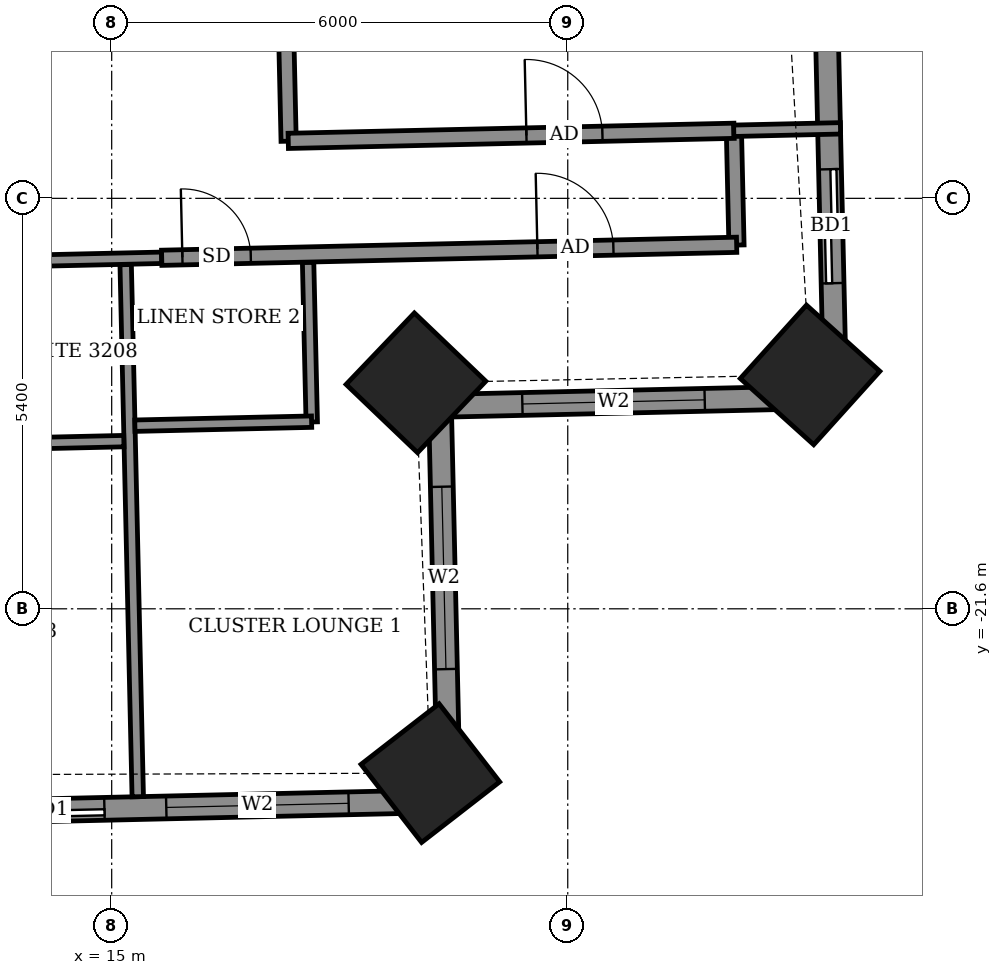
"""IFC4 building model, lengths in metres.
Left out: names, types, materials, properties, quantities, classifications, styles, units other than length and angle.
Written with IfcOpenShell. Run it as: python <this file> out.ifc"""

import sys

from ifc_helpers import new_model, si_unit, direction, frame, frame_2d, origin, origin_2d, place, context, subcontext, project, spatial, rectangle, extrude, element, fill, save


model = new_model("IFC4")
c1 = context("Model", 3, precision=1e-05, world=origin(), true_north=direction((0.0, 1.0)))
c2 = subcontext(c1, "Body", "Model", "MODEL_VIEW")
j1 = project(units=[si_unit("LENGTHUNIT", "METRE"), si_unit("PLANEANGLEUNIT", "RADIAN")], contexts=[c1])
p1 = place(None, origin())
s1 = spatial("IfcSite", under=j1, at=p1, CompositionType="ELEMENT")
p2 = place(p1, origin())
s2 = spatial("IfcBuilding", under=s1, at=p2, CompositionType="ELEMENT")
p3 = place(p2, frame((0.0, 0.0, 130.1)))
s3 = spatial("IfcBuildingStorey", under=s2, at=p3, CompositionType="ELEMENT", Elevation=130.1)
for number, where, z_axis, x_axis in (
    (1, (19.192, -23.761, -0.55), (0.0, 0.0, 1.0), (0.79, 0.613, 0.0)),
    (2, (19.003, -18.627, -0.55), (0.0, 0.0, 1.0), (0.691, 0.723, 0.0)),
    (3, (24.188, -18.523, -0.55), (0.0, 0.0, 1.0), (0.67, 0.743, 0.0)),
):
    element("IfcColumn", number, at=place(p3, frame(where, z_axis=z_axis, x_axis=x_axis)), inside=s3, PredefinedType="COLUMN", context=c2, shape_type="SweptSolid", body=[
        extrude(rectangle(XDim=1.3, YDim=1.3, at=origin_2d()), origin(), (0.0, 0.0, 1.0), 3.6),
    ])
p4 = place(p3, frame((24.518, -18.812, 0.0), z_axis=(0.0, 0.0, 1.0), x_axis=(-0.02269451316, 0.999742446369, 0.0)))
e4 = element("IfcWall", 4, at=p4, inside=s3, PredefinedType="SOLIDWALL", context=c2, shape_type="SweptSolid", body=[
    extrude(rectangle(XDim=10.93, YDim=0.3, at=frame_2d((5.465, 0.0))), origin(), (0.0, 0.0, 1.0), 3.05),
])
p5 = place(p4, frame((1.496, 0.0, 0.0)))
e5 = element("IfcOpeningElement", 5, at=p5, cuts=e4, PredefinedType="OPENING", context=c2, shape_type="SweptSolid", body=[
    extrude(rectangle(XDim=1.5, YDim=2.4, at=frame_2d((0.75, 1.2))), frame((0.0, 0.16, 0.0), z_axis=(0.0, -1.0, 0.0), x_axis=(1.0, 0.0, 0.0)), (0.0, 0.0, 1.0), 0.32),
])
p6 = place(p4, frame((6.244, 0.0, 0.9)))
e6 = element("IfcOpeningElement", 6, at=p6, cuts=e4, PredefinedType="OPENING", context=c2, shape_type="SweptSolid", body=[
    extrude(rectangle(XDim=0.9, YDim=1.5, at=frame_2d((0.45, 0.75))), frame((0.0, 0.16, 0.0), z_axis=(0.0, -1.0, 0.0), x_axis=(1.0, 0.0, 0.0)), (0.0, 0.0, 1.0), 0.32),
])
p7 = place(p4, frame((8.4, 0.0, 0.9)))
e7 = element("IfcOpeningElement", 7, at=p7, cuts=e4, PredefinedType="OPENING", context=c2, shape_type="SweptSolid", body=[
    extrude(rectangle(XDim=1.2, YDim=1.5, at=frame_2d((0.6, 0.75))), frame((0.0, 0.16, 0.0), z_axis=(0.0, -1.0, 0.0), x_axis=(1.0, 0.0, 0.0)), (0.0, 0.0, 1.0), 0.32),
])
p8 = place(p3, frame((-22.396, -25.078, 0.0), z_axis=(0.0, 0.0, 1.0), x_axis=(0.99974279854, 0.022678993965, 0.0)))
e8 = element("IfcWall", 8, at=p8, inside=s3, PredefinedType="SOLIDWALL", context=c2, shape_type="SweptSolid", body=[
    extrude(rectangle(XDim=41.844, YDim=0.3, at=frame_2d((20.922, 0.0))), origin(), (0.0, 0.0, 1.0), 3.05),
])
p9 = place(p8, frame((1.696, 0.0, 0.0)))
e9 = element("IfcOpeningElement", 9, at=p9, cuts=e8, PredefinedType="OPENING", context=c2, shape_type="SweptSolid", body=[
    extrude(rectangle(XDim=1.5, YDim=2.4, at=frame_2d((0.75, 1.2))), frame((0.0, 0.16, 0.0), z_axis=(0.0, -1.0, 0.0), x_axis=(1.0, 0.0, 0.0)), (0.0, 0.0, 1.0), 0.32),
])
p10 = place(p8, frame((4.512, 0.0, 0.0)))
e10 = element("IfcOpeningElement", 10, at=p10, cuts=e8, PredefinedType="OPENING", context=c2, shape_type="SweptSolid", body=[
    extrude(rectangle(XDim=1.5, YDim=2.4, at=frame_2d((0.75, 1.2))), frame((0.0, 0.16, 0.0), z_axis=(0.0, -1.0, 0.0), x_axis=(1.0, 0.0, 0.0)), (0.0, 0.0, 1.0), 0.32),
])
p11 = place(p8, frame((9.625, 0.0, 0.0)))
e11 = element("IfcOpeningElement", 11, at=p11, cuts=e8, PredefinedType="OPENING", context=c2, shape_type="SweptSolid", body=[
    extrude(rectangle(XDim=1.5, YDim=2.4, at=frame_2d((0.75, 1.2))), frame((0.0, 0.16, 0.0), z_axis=(0.0, -1.0, 0.0), x_axis=(1.0, 0.0, 0.0)), (0.0, 0.0, 1.0), 0.32),
])
p12 = place(p8, frame((14.749, 0.0, 0.0)))
e12 = element("IfcOpeningElement", 12, at=p12, cuts=e8, PredefinedType="OPENING", context=c2, shape_type="SweptSolid", body=[
    extrude(rectangle(XDim=1.5, YDim=2.4, at=frame_2d((0.75, 1.2))), frame((0.0, 0.16, 0.0), z_axis=(0.0, -1.0, 0.0), x_axis=(1.0, 0.0, 0.0)), (0.0, 0.0, 1.0), 0.32),
])
p13 = place(p8, frame((17.861, 0.0, 0.0)))
e13 = element("IfcOpeningElement", 13, at=p13, cuts=e8, PredefinedType="OPENING", context=c2, shape_type="SweptSolid", body=[
    extrude(rectangle(XDim=1.5, YDim=2.4, at=frame_2d((0.75, 1.2))), frame((0.0, 0.16, 0.0), z_axis=(0.0, -1.0, 0.0), x_axis=(1.0, 0.0, 0.0)), (0.0, 0.0, 1.0), 0.32),
])
p14 = place(p8, frame((22.486, 0.0, 0.0)))
e14 = element("IfcOpeningElement", 14, at=p14, cuts=e8, PredefinedType="OPENING", context=c2, shape_type="SweptSolid", body=[
    extrude(rectangle(XDim=1.5, YDim=2.4, at=frame_2d((0.75, 1.2))), frame((0.0, 0.16, 0.0), z_axis=(0.0, -1.0, 0.0), x_axis=(1.0, 0.0, 0.0)), (0.0, 0.0, 1.0), 0.32),
])
p15 = place(p8, frame((25.598, 0.0, 0.0)))
e15 = element("IfcOpeningElement", 15, at=p15, cuts=e8, PredefinedType="OPENING", context=c2, shape_type="SweptSolid", body=[
    extrude(rectangle(XDim=1.5, YDim=2.4, at=frame_2d((0.75, 1.2))), frame((0.0, 0.16, 0.0), z_axis=(0.0, -1.0, 0.0), x_axis=(1.0, 0.0, 0.0)), (0.0, 0.0, 1.0), 0.32),
])
p16 = place(p8, frame((30.7, 0.0, 0.0)))
e16 = element("IfcOpeningElement", 16, at=p16, cuts=e8, PredefinedType="OPENING", context=c2, shape_type="SweptSolid", body=[
    extrude(rectangle(XDim=1.5, YDim=2.4, at=frame_2d((0.75, 1.2))), frame((0.0, 0.16, 0.0), z_axis=(0.0, -1.0, 0.0), x_axis=(1.0, 0.0, 0.0)), (0.0, 0.0, 1.0), 0.32),
])
p17 = place(p8, frame((35.81, 0.0, 0.0)))
e17 = element("IfcOpeningElement", 17, at=p17, cuts=e8, PredefinedType="OPENING", context=c2, shape_type="SweptSolid", body=[
    extrude(rectangle(XDim=1.5, YDim=2.4, at=frame_2d((0.75, 1.2))), frame((0.0, 0.16, 0.0), z_axis=(0.0, -1.0, 0.0), x_axis=(1.0, 0.0, 0.0)), (0.0, 0.0, 1.0), 0.32),
])
p18 = place(p8, frame((38.124, 0.0, 0.9)))
e18 = element("IfcOpeningElement", 18, at=p18, cuts=e8, PredefinedType="OPENING", context=c2, shape_type="SweptSolid", body=[
    extrude(rectangle(XDim=2.4, YDim=1.5, at=frame_2d((1.2, 0.75))), frame((0.0, 0.16, 0.0), z_axis=(0.0, -1.0, 0.0), x_axis=(1.0, 0.0, 0.0)), (0.0, 0.0, 1.0), 0.32),
])
p19 = place(p3, frame((19.437, -24.129, 0.0), z_axis=(0.0, 0.0, 1.0), x_axis=(-0.022675548694, 0.99974287669, 0.0)))
e19 = element("IfcWall", 19, at=p19, inside=s3, PredefinedType="SOLIDWALL", context=c2, shape_type="SweptSolid", body=[
    extrude(rectangle(XDim=5.2, YDim=0.3, at=frame_2d((2.6, 0.0))), origin(), (0.0, 0.0, 1.0), 2.55),
])
p20 = place(p19, frame((1.736, 0.0, 0.9)))
e20 = element("IfcOpeningElement", 20, at=p20, cuts=e19, PredefinedType="OPENING", context=c2, shape_type="SweptSolid", body=[
    extrude(rectangle(XDim=2.4, YDim=1.5, at=frame_2d((1.2, 0.75))), frame((0.0, 0.16, 0.0), z_axis=(0.0, -1.0, 0.0), x_axis=(1.0, 0.0, 0.0)), (0.0, 0.0, 1.0), 0.32),
])
p21 = place(p3, frame((19.319, -18.93, 0.0), z_axis=(0.0, 0.0, 1.0), x_axis=(0.99974287669, 0.022675548694, 0.0)))
e21 = element("IfcWall", 21, at=p21, inside=s3, PredefinedType="SOLIDWALL", context=c2, shape_type="SweptSolid", body=[
    extrude(rectangle(XDim=5.2, YDim=0.3, at=frame_2d((2.6, 0.0))), origin(), (0.0, 0.0, 1.0), 2.55),
])
p22 = place(p21, frame((1.084, 0.0, 0.9)))
e22 = element("IfcOpeningElement", 22, at=p22, cuts=e21, PredefinedType="OPENING", context=c2, shape_type="SweptSolid", body=[
    extrude(rectangle(XDim=2.4, YDim=1.5, at=frame_2d((1.2, 0.75))), frame((0.0, 0.16, 0.0), z_axis=(0.0, -1.0, 0.0), x_axis=(1.0, 0.0, 0.0)), (0.0, 0.0, 1.0), 0.32),
])
p23 = place(p3, frame((15.343, -24.072, 0.0), z_axis=(0.0, 0.0, 1.0), x_axis=(-0.022699227919, 0.999742339331, 0.0)))
e23 = element("IfcWall", 23, at=p23, inside=s3, PredefinedType="PARTITIONING", context=c2, shape_type="SweptSolid", body=[
    extrude(rectangle(XDim=7.002, YDim=0.15, at=frame_2d((3.501, 0.0))), origin(), (0.0, 0.0, 1.0), 2.55),
])
p24 = place(p3, frame((12.835, -19.447, 0.0), z_axis=(0.0, 0.0, 1.0), x_axis=(0.999740478815, 0.022781023197, 0.0)))
e24 = element("IfcWall", 24, at=p24, inside=s3, PredefinedType="PARTITIONING", context=c2, shape_type="SweptSolid", body=[
    extrude(rectangle(XDim=2.325, YDim=0.15, at=frame_2d((1.163, 0.0))), origin(), (0.0, 0.0, 1.0), 3.05),
])
p25 = place(p3, frame((17.632, -19.142, 0.0), z_axis=(0.0, 0.0, 1.0), x_axis=(-0.022906293375, 0.999737616439, 0.0)))
e25 = element("IfcWall", 25, at=p25, inside=s3, PredefinedType="PARTITIONING", context=c2, shape_type="SweptSolid", body=[
    extrude(rectangle(XDim=2.1, YDim=0.15, at=frame_2d((1.05, 0.0))), origin(), (0.0, 0.0, 1.0), 3.05),
])
p26 = place(p3, frame((15.305, -19.191, 0.0), z_axis=(0.0, 0.0, 1.0), x_axis=(0.999740478815, 0.022781023197, 0.0)))
e26 = element("IfcWall", 26, at=p26, inside=s3, PredefinedType="PARTITIONING", context=c2, shape_type="SweptSolid", body=[
    extrude(rectangle(XDim=2.325, YDim=0.15, at=frame_2d((1.163, 0.0))), origin(), (0.0, 0.0, 1.0), 3.05),
])
p27 = place(p3, frame((23.22, -16.815, 0.0), z_axis=(0.0, 0.0, 1.0), x_axis=(-0.022617910375, 0.999744182344, 0.0)))
e27 = element("IfcWall", 27, at=p27, inside=s3, PredefinedType="PARTITIONING", context=c2, shape_type="SweptSolid", body=[
    extrude(rectangle(XDim=1.5, YDim=0.2, at=frame_2d((0.75, 0.0))), origin(), (0.0, 0.0, 1.0), 3.05),
])
p28 = place(p3, frame((-14.871, -17.675, 0.0), z_axis=(0.0, 0.0, 1.0), x_axis=(0.999742359486, 0.02269834024, 0.0)))
e28 = element("IfcWall", 28, at=p28, inside=s3, PredefinedType="PARTITIONING", context=c2, shape_type="SweptSolid", body=[
    extrude(rectangle(XDim=30.536, YDim=0.15, at=frame_2d((15.268, 0.0))), origin(), (0.0, 0.0, 1.0), 3.05),
])
p29 = place(p28, frame((1.034, 0.0, 0.0)))
e29 = element("IfcOpeningElement", 29, at=p29, cuts=e28, PredefinedType="OPENING", context=c2, shape_type="SweptSolid", body=[
    extrude(rectangle(XDim=0.9, YDim=2.1, at=frame_2d((0.45, 1.05))), frame((0.0, 0.085, 0.0), z_axis=(0.0, -1.0, 0.0), x_axis=(1.0, 0.0, 0.0)), (0.0, 0.0, 1.0), 0.17),
])
p30 = place(p28, frame((7.659, 0.0, 0.0)))
e30 = element("IfcOpeningElement", 30, at=p30, cuts=e28, PredefinedType="OPENING", context=c2, shape_type="SweptSolid", body=[
    extrude(rectangle(XDim=0.9, YDim=2.1, at=frame_2d((0.45, 1.05))), frame((0.0, 0.085, 0.0), z_axis=(0.0, -1.0, 0.0), x_axis=(1.0, 0.0, 0.0)), (0.0, 0.0, 1.0), 0.17),
])
p31 = place(p28, frame((9.459, 0.0, 0.0)))
e31 = element("IfcOpeningElement", 31, at=p31, cuts=e28, PredefinedType="OPENING", context=c2, shape_type="SweptSolid", body=[
    extrude(rectangle(XDim=0.9, YDim=2.1, at=frame_2d((0.45, 1.05))), frame((0.0, 0.085, 0.0), z_axis=(0.0, -1.0, 0.0), x_axis=(1.0, 0.0, 0.0)), (0.0, 0.0, 1.0), 0.17),
])
p32 = place(p28, frame((16.084, 0.0, 0.0)))
e32 = element("IfcOpeningElement", 32, at=p32, cuts=e28, PredefinedType="OPENING", context=c2, shape_type="SweptSolid", body=[
    extrude(rectangle(XDim=0.9, YDim=2.1, at=frame_2d((0.45, 1.05))), frame((0.0, 0.085, 0.0), z_axis=(0.0, -1.0, 0.0), x_axis=(1.0, 0.0, 0.0)), (0.0, 0.0, 1.0), 0.17),
])
p33 = place(p28, frame((17.909, 0.0, 0.0)))
e33 = element("IfcOpeningElement", 33, at=p33, cuts=e28, PredefinedType="OPENING", context=c2, shape_type="SweptSolid", body=[
    extrude(rectangle(XDim=0.9, YDim=2.1, at=frame_2d((0.45, 1.05))), frame((0.0, 0.085, 0.0), z_axis=(0.0, -1.0, 0.0), x_axis=(1.0, 0.0, 0.0)), (0.0, 0.0, 1.0), 0.17),
])
p34 = place(p28, frame((24.509, 0.0, 0.0)))
e34 = element("IfcOpeningElement", 34, at=p34, cuts=e28, PredefinedType="OPENING", context=c2, shape_type="SweptSolid", body=[
    extrude(rectangle(XDim=0.9, YDim=2.1, at=frame_2d((0.45, 1.05))), frame((0.0, 0.085, 0.0), z_axis=(0.0, -1.0, 0.0), x_axis=(1.0, 0.0, 0.0)), (0.0, 0.0, 1.0), 0.17),
])
p35 = place(p28, frame((26.309, 0.0, 0.0)))
e35 = element("IfcOpeningElement", 35, at=p35, cuts=e28, PredefinedType="OPENING", context=c2, shape_type="SweptSolid", body=[
    extrude(rectangle(XDim=0.9, YDim=2.1, at=frame_2d((0.45, 1.05))), frame((0.0, 0.085, 0.0), z_axis=(0.0, -1.0, 0.0), x_axis=(1.0, 0.0, 0.0)), (0.0, 0.0, 1.0), 0.17),
])
p36 = place(p3, frame((15.658, -16.982, 0.0), z_axis=(0.0, 0.0, 1.0), x_axis=(0.99974485859, 0.022587999516, 0.0)))
e36 = element("IfcWall", 36, at=p36, inside=s3, PredefinedType="PARTITIONING", context=c2, shape_type="SweptSolid", body=[
    extrude(rectangle(XDim=7.566, YDim=0.2, at=frame_2d((3.783, 0.0))), origin(), (0.0, 0.0, 1.0), 3.05),
])
p37 = place(p36, frame((4.944, 0.0, 0.0)))
e37 = element("IfcOpeningElement", 37, at=p37, cuts=e36, PredefinedType="OPENING", context=c2, shape_type="SweptSolid", body=[
    extrude(rectangle(XDim=1.0, YDim=2.1, at=frame_2d((0.5, 1.05))), frame((0.0, 0.11, 0.0), z_axis=(0.0, -1.0, 0.0), x_axis=(1.0, 0.0, 0.0)), (0.0, 0.0, 1.0), 0.22),
])
p38 = place(p36, frame((0.272, 0.0, 0.0)))
e38 = element("IfcOpeningElement", 38, at=p38, cuts=e36, PredefinedType="OPENING", context=c2, shape_type="SweptSolid", body=[
    extrude(rectangle(XDim=0.9, YDim=2.1, at=frame_2d((0.45, 1.05))), frame((0.0, 0.11, 0.0), z_axis=(0.0, -1.0, 0.0), x_axis=(1.0, 0.0, 0.0)), (0.0, 0.0, 1.0), 0.22),
])
p39 = place(p3, frame((17.328, -15.448, 0.0), z_axis=(0.0, 0.0, 1.0), x_axis=(-0.022680883318, 0.999742755679, 0.0)))
e39 = element("IfcWall", 39, at=p39, inside=s3, PredefinedType="PARTITIONING", context=c2, shape_type="SweptSolid", body=[
    extrude(rectangle(XDim=7.664, YDim=0.2, at=frame_2d((3.832, 0.0))), origin(), (0.0, 0.0, 1.0), 3.05),
])
p40 = place(p39, frame((5.255, 0.0, 0.0)))
e40 = element("IfcOpeningElement", 40, at=p40, cuts=e39, PredefinedType="OPENING", context=c2, shape_type="SweptSolid", body=[
    extrude(rectangle(XDim=1.0, YDim=2.1, at=frame_2d((0.5, 1.05))), frame((0.0, 0.11, 0.0), z_axis=(0.0, -1.0, 0.0), x_axis=(1.0, 0.0, 0.0)), (0.0, 0.0, 1.0), 0.22),
])
p41 = place(p3, frame((17.323, -15.444, 0.0), z_axis=(0.0, 0.0, 1.0), x_axis=(0.999742758565, 0.022680756085, 0.0)))
e41 = element("IfcWall", 41, at=p41, inside=s3, PredefinedType="PARTITIONING", context=c2, shape_type="SweptSolid", body=[
    extrude(rectangle(XDim=5.866, YDim=0.2, at=frame_2d((2.933, 0.0))), origin(), (0.0, 0.0, 1.0), 3.05),
])
p42 = place(p41, frame((3.134, 0.0, 0.0)))
e42 = element("IfcOpeningElement", 42, at=p42, cuts=e41, PredefinedType="OPENING", context=c2, shape_type="SweptSolid", body=[
    extrude(rectangle(XDim=1.0, YDim=2.1, at=frame_2d((0.5, 1.05))), frame((0.0, 0.11, 0.0), z_axis=(0.0, -1.0, 0.0), x_axis=(1.0, 0.0, 0.0)), (0.0, 0.0, 1.0), 0.22),
])
p43 = place(p3, frame((23.184, -15.311, 0.0), z_axis=(0.0, 0.0, 1.0), x_axis=(0.999740577356, 0.022776698371, 0.0)))
e43 = element("IfcWall", 43, at=p43, inside=s3, PredefinedType="PARTITIONING", context=c2, shape_type="SweptSolid", body=[
    extrude(rectangle(XDim=1.404, YDim=0.15, at=frame_2d((0.702, 0.0))), origin(), (0.0, 0.0, 1.0), 2.55),
])
p44 = place(p5, origin())
e44 = element("IfcDoor", 44, at=p44, inside=s3, OperationType="SLIDING_TO_LEFT", PredefinedType="DOOR", context=c2, shape_type="SweptSolid", body=[
    extrude(rectangle(XDim=1.5, YDim=2.4, at=frame_2d((0.75, 1.2))), frame((0.0, 0.025, 0.0), z_axis=(0.0, -1.0, 0.0), x_axis=(1.0, 0.0, 0.0)), (0.0, 0.0, 1.0), 0.05),
])
fill(e5, e44)
p45 = place(p17, origin())
e45 = element("IfcDoor", 45, at=p45, inside=s3, OperationType="SLIDING_TO_LEFT", PredefinedType="DOOR", context=c2, shape_type="SweptSolid", body=[
    extrude(rectangle(XDim=1.5, YDim=2.4, at=frame_2d((0.75, 1.2))), frame((0.0, 0.025, 0.0), z_axis=(0.0, -1.0, 0.0), x_axis=(1.0, 0.0, 0.0)), (0.0, 0.0, 1.0), 0.05),
])
fill(e17, e45)
p46 = place(p18, origin())
e46 = element("IfcWindow", 46, at=p46, inside=s3, PartitioningType="DOUBLE_PANEL_VERTICAL", PredefinedType="WINDOW", context=c2, shape_type="SweptSolid", body=[
    extrude(rectangle(XDim=2.4, YDim=1.5, at=frame_2d((1.2, 0.75))), frame((0.0, 0.03, 0.0), z_axis=(0.0, -1.0, 0.0), x_axis=(1.0, 0.0, 0.0)), (0.0, 0.0, 1.0), 0.06),
])
fill(e18, e46)
p47 = place(p20, origin())
e47 = element("IfcWindow", 47, at=p47, inside=s3, PartitioningType="DOUBLE_PANEL_VERTICAL", PredefinedType="WINDOW", context=c2, shape_type="SweptSolid", body=[
    extrude(rectangle(XDim=2.4, YDim=1.5, at=frame_2d((1.2, 0.75))), frame((0.0, 0.03, 0.0), z_axis=(0.0, -1.0, 0.0), x_axis=(1.0, 0.0, 0.0)), (0.0, 0.0, 1.0), 0.06),
])
fill(e20, e47)
p48 = place(p22, origin())
e48 = element("IfcWindow", 48, at=p48, inside=s3, PartitioningType="DOUBLE_PANEL_VERTICAL", PredefinedType="WINDOW", context=c2, shape_type="SweptSolid", body=[
    extrude(rectangle(XDim=2.4, YDim=1.5, at=frame_2d((1.2, 0.75))), frame((0.0, 0.03, 0.0), z_axis=(0.0, -1.0, 0.0), x_axis=(1.0, 0.0, 0.0)), (0.0, 0.0, 1.0), 0.06),
])
fill(e22, e48)
p49 = place(p37, origin())
e49 = element("IfcDoor", 49, at=p49, inside=s3, OperationType="SINGLE_SWING_RIGHT", PredefinedType="DOOR", context=c2, shape_type="SweptSolid", body=[
    extrude(rectangle(XDim=1.0, YDim=2.1, at=frame_2d((0.5, 1.05))), frame((0.0, 0.025, 0.0), z_axis=(0.0, -1.0, 0.0), x_axis=(1.0, 0.0, 0.0)), (0.0, 0.0, 1.0), 0.05),
])
fill(e37, e49)
p50 = place(p38, origin())
e50 = element("IfcDoor", 50, at=p50, inside=s3, OperationType="SINGLE_SWING_RIGHT", PredefinedType="DOOR", context=c2, shape_type="SweptSolid", body=[
    extrude(rectangle(XDim=0.9, YDim=2.1, at=frame_2d((0.45, 1.05))), frame((0.0, 0.025, 0.0), z_axis=(0.0, -1.0, 0.0), x_axis=(1.0, 0.0, 0.0)), (0.0, 0.0, 1.0), 0.05),
])
fill(e38, e50)
p51 = place(p42, origin())
e51 = element("IfcDoor", 51, at=p51, inside=s3, OperationType="SINGLE_SWING_LEFT", PredefinedType="DOOR", context=c2, shape_type="SweptSolid", body=[
    extrude(rectangle(XDim=1.0, YDim=2.1, at=frame_2d((0.5, 1.05))), frame((0.0, 0.025, 0.0), z_axis=(0.0, -1.0, 0.0), x_axis=(1.0, 0.0, 0.0)), (0.0, 0.0, 1.0), 0.05),
])
fill(e42, e51)
save(model, sys.argv[1])
